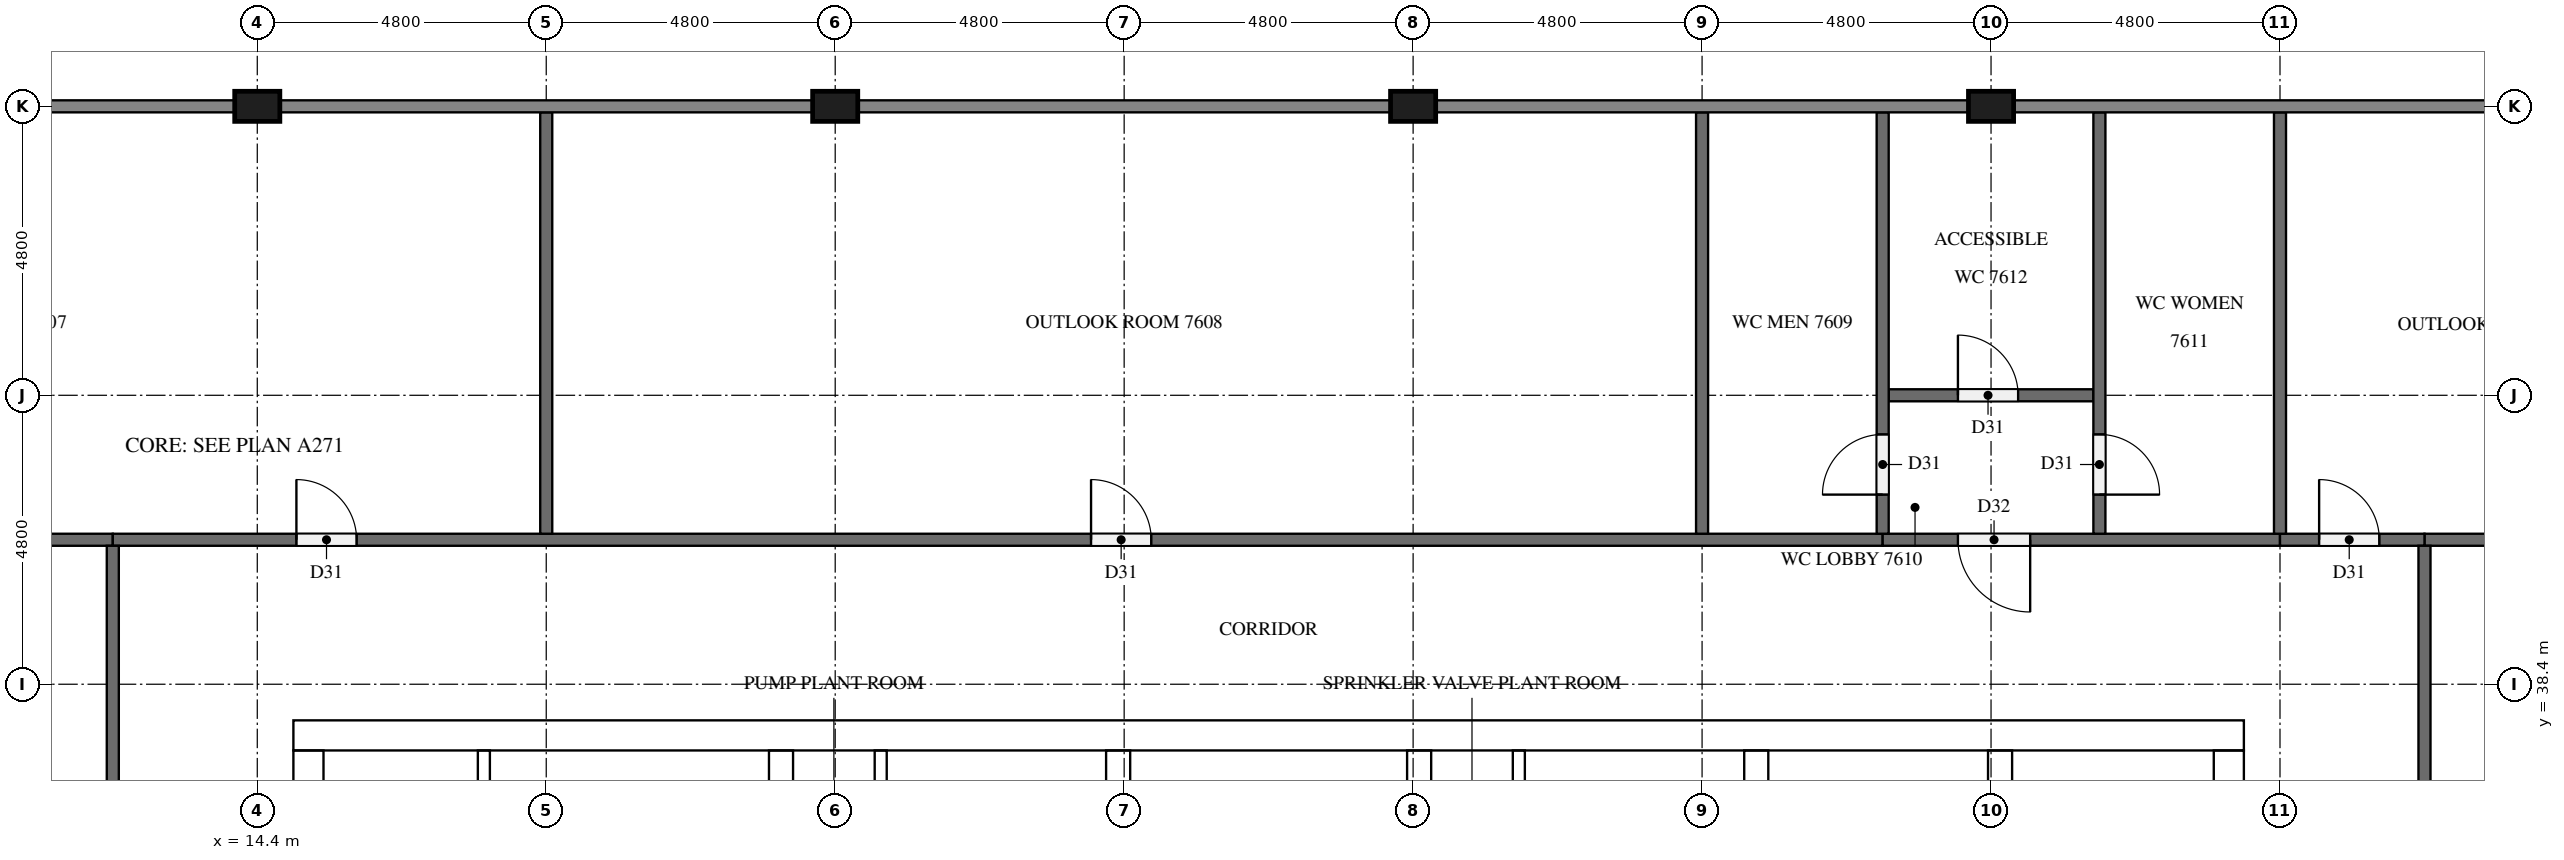
"""IFC4 building model, lengths in metres.
Left out: names, types, materials, properties, quantities, classifications, styles, units other than length and angle.
Written with IfcOpenShell. Run it as: python <this file> out.ifc"""

import sys

from ifc_helpers import new_model, si_unit, direction, frame, frame_2d, origin, origin_2d, place, context, subcontext, project, spatial, rectangle, extrude, element, fill, save


model = new_model("IFC4")
c1 = context("Model", 3, precision=1e-05, world=origin(), true_north=direction((0.0, 1.0)))
c2 = subcontext(c1, "Body", "Model", "MODEL_VIEW")
j1 = project(units=[si_unit("LENGTHUNIT", "METRE"), si_unit("PLANEANGLEUNIT", "RADIAN")], contexts=[c1])
p1 = place(None, origin())
s1 = spatial("IfcSite", under=j1, at=p1, CompositionType="ELEMENT")
p2 = place(p1, origin())
s2 = spatial("IfcBuilding", under=s1, at=p2, CompositionType="ELEMENT")
p3 = place(p2, frame((0.0, 0.0, 291.5)))
s3 = spatial("IfcBuildingStorey", under=s2, at=p3, CompositionType="ELEMENT", Elevation=291.5)
p4 = place(p3, frame((15.0, 37.55, 0.0), z_axis=(0.0, 0.0, 1.0), x_axis=(1.0, 0.0, 0.0)))
e1 = element("IfcWall", 1, at=p4, inside=s3, PredefinedType="SHEAR", context=c2, shape_type="SweptSolid", body=[
    extrude(rectangle(XDim=32.4, YDim=0.5, at=frame_2d((16.2, 0.0))), origin(), (0.0, 0.0, 1.0), 4.4),
])
p5 = place(p4, frame((15.3, 0.0, 0.0)))
e2 = element("IfcOpeningElement", 2, at=p5, cuts=e1, PredefinedType="OPENING", context=c2, shape_type="SweptSolid", body=[
    extrude(rectangle(XDim=1.8, YDim=2.1, at=frame_2d((0.9, 1.05))), frame((0.0, 0.26, 0.0), z_axis=(0.0, -1.0, 0.0), x_axis=(1.0, 0.0, 0.0)), (0.0, 0.0, 1.0), 0.52),
])
p6 = place(p4, frame((1.282, 0.0, 0.0)))
e3 = element("IfcOpeningElement", 3, at=p6, cuts=e1, PredefinedType="OPENING", context=c2, shape_type="SweptSolid", body=[
    extrude(rectangle(XDim=1.0, YDim=2.1, at=frame_2d((0.5, 1.05))), frame((0.0, 0.26, 0.0), z_axis=(0.0, -1.0, 0.0), x_axis=(1.0, 0.0, 0.0)), (0.0, 0.0, 1.0), 0.52),
])
p7 = place(p4, frame((5.082, 0.0, 0.0)))
e4 = element("IfcOpeningElement", 4, at=p7, cuts=e1, PredefinedType="OPENING", context=c2, shape_type="SweptSolid", body=[
    extrude(rectangle(XDim=1.0, YDim=2.1, at=frame_2d((0.5, 1.05))), frame((0.0, 0.26, 0.0), z_axis=(0.0, -1.0, 0.0), x_axis=(1.0, 0.0, 0.0)), (0.0, 0.0, 1.0), 0.52),
])
p8 = place(p3, frame((15.25, 15.5, 0.0), z_axis=(0.0, 0.0, 1.0), x_axis=(0.0, 1.0, 0.0)))
e5 = element("IfcWall", 5, at=p8, inside=s3, PredefinedType="SHEAR", context=c2, shape_type="SweptSolid", body=[
    extrude(rectangle(XDim=21.8, YDim=0.5, at=frame_2d((10.9, 0.0))), origin(), (0.0, 0.0, 1.0), 4.4),
])
p9 = place(p8, frame((5.26, 0.0, 0.0)))
e6 = element("IfcOpeningElement", 6, at=p9, cuts=e5, PredefinedType="OPENING", context=c2, shape_type="SweptSolid", body=[
    extrude(rectangle(XDim=1.2, YDim=2.1, at=frame_2d((0.6, 1.05))), frame((0.0, 0.26, 0.0), z_axis=(0.0, -1.0, 0.0), x_axis=(1.0, 0.0, 0.0)), (0.0, 0.0, 1.0), 0.52),
])
p10 = place(p3, frame((47.15, 15.5, 0.0), z_axis=(0.0, 0.0, 1.0), x_axis=(0.0, 1.0, 0.0)))
e7 = element("IfcWall", 7, at=p10, inside=s3, PredefinedType="SHEAR", context=c2, shape_type="SweptSolid", body=[
    extrude(rectangle(XDim=21.8, YDim=0.5, at=frame_2d((10.9, 0.0))), origin(), (0.0, 0.0, 1.0), 4.4),
])
p11 = place(p10, frame((10.6, 0.0, 0.0)))
e8 = element("IfcOpeningElement", 8, at=p11, cuts=e7, PredefinedType="OPENING", context=c2, shape_type="SweptSolid", body=[
    extrude(rectangle(XDim=1.2, YDim=2.1, at=frame_2d((0.6, 1.05))), frame((0.0, 0.26, 0.0), z_axis=(0.0, -1.0, 0.0), x_axis=(1.0, 0.0, 0.0)), (0.0, 0.0, 1.0), 0.52),
])
p12 = place(p3, frame((23.1, 15.5, 0.0), z_axis=(0.0, 0.0, 1.0), x_axis=(0.0, 1.0, 0.0)))
e9 = element("IfcWall", 9, at=p12, inside=s3, PredefinedType="SHEAR", context=c2, shape_type="SweptSolid", body=[
    extrude(rectangle(XDim=21.8, YDim=0.4, at=frame_2d((10.9, 0.0))), origin(), (0.0, 0.0, 1.0), 4.4),
])
p13 = place(p3, frame((39.3, 27.75, 0.0), z_axis=(0.0, 0.0, 1.0), x_axis=(0.0, 1.0, 0.0)))
e10 = element("IfcWall", 10, at=p13, inside=s3, PredefinedType="SHEAR", context=c2, shape_type="SweptSolid", body=[
    extrude(rectangle(XDim=9.55, YDim=0.4, at=frame_2d((4.775, 0.0))), origin(), (0.0, 0.0, 1.0), 4.4),
])
p14 = place(p3, frame((43.35, 27.75, 0.0), z_axis=(0.0, 0.0, 1.0), x_axis=(0.0, 1.0, 0.0)))
e11 = element("IfcWall", 11, at=p14, inside=s3, PredefinedType="SHEAR", context=c2, shape_type="SweptSolid", body=[
    extrude(rectangle(XDim=9.55, YDim=0.4, at=frame_2d((4.775, 0.0))), origin(), (0.0, 0.0, 1.0), 4.4),
])
p15 = place(p14, frame((7.65, 0.0, 0.0)))
e12 = element("IfcOpeningElement", 12, at=p15, cuts=e11, PredefinedType="OPENING", context=c2, shape_type="SweptSolid", body=[
    extrude(rectangle(XDim=1.2, YDim=2.1, at=frame_2d((0.6, 1.05))), frame((0.0, 0.21, 0.0), z_axis=(0.0, -1.0, 0.0), x_axis=(1.0, 0.0, 0.0)), (0.0, 0.0, 1.0), 0.42),
])
for number, where, z_axis, x_axis in (
    (13, (28.7, 33.75, 0.0), (0.0, 0.0, 1.0), (0.0, 1.0, 0.0)),
    (14, (33.7, 33.75, 0.0), (0.0, 0.0, 1.0), (0.0, 1.0, 0.0)),
):
    element("IfcWall", number, at=place(p3, frame(where, z_axis=z_axis, x_axis=x_axis)), inside=s3, PredefinedType="SHEAR", context=c2, shape_type="SweptSolid", body=[
        extrude(rectangle(XDim=3.55, YDim=0.4, at=frame_2d((1.775, 0.0))), origin(), (0.0, 0.0, 1.0), 4.4),
    ])
for number, where, z_axis, x_axis in (
    (15, (43.2, 48.0, 0.0), (0.0, 0.0, 1.0), (1.0, 0.0, 0.0)),
    (16, (33.6, 48.0, 0.0), (0.0, 0.0, 1.0), (1.0, 0.0, 0.0)),
    (17, (24.0, 48.0, 0.0), (0.0, 0.0, 1.0), (1.0, 0.0, 0.0)),
    (18, (14.4, 48.0, 0.0), (0.0, 0.0, 1.0), (1.0, 0.0, 0.0)),
):
    element("IfcColumn", number, at=place(p3, frame(where, z_axis=z_axis, x_axis=x_axis)), inside=s3, PredefinedType="COLUMN", context=c2, shape_type="SweptSolid", body=[
        extrude(rectangle(XDim=0.75, YDim=0.5, at=origin_2d()), origin(), (0.0, 0.0, 1.0), 4.4),
    ])
p16 = place(p3, frame((18.164, 31.45, 0.0), z_axis=(0.0, 0.0, 1.0), x_axis=(0.0, 1.0, 0.0)))
e19 = element("IfcWall", 19, at=p16, inside=s3, PredefinedType="PARTITIONING", context=c2, shape_type="SweptSolid", body=[
    extrude(rectangle(XDim=5.85, YDim=0.2, at=frame_2d((2.925, 0.0))), origin(), (0.0, 0.0, 1.0), 4.4),
])
for number, where, z_axis, x_axis in (
    (20, (24.756, 33.75, 0.0), (0.0, 0.0, 1.0), (0.0, 1.0, 0.0)),
    (21, (35.356, 33.75, 0.0), (0.0, 0.0, 1.0), (0.0, 1.0, 0.0)),
):
    element("IfcWall", number, at=place(p3, frame(where, z_axis=z_axis, x_axis=x_axis)), inside=s3, PredefinedType="PARTITIONING", context=c2, shape_type="SweptSolid", body=[
        extrude(rectangle(XDim=3.55, YDim=0.2, at=frame_2d((1.775, 0.0))), origin(), (0.0, 0.0, 1.0), 4.4),
    ])
p17 = place(p3, frame((0.1, 40.8, 0.0), z_axis=(0.0, 0.0, 1.0), x_axis=(1.0, 0.0, 0.0)))
e22 = element("IfcWall", 22, at=p17, inside=s3, PredefinedType="PARTITIONING", context=c2, shape_type="SweptSolid", body=[
    extrude(rectangle(XDim=11.9, YDim=0.2, at=frame_2d((5.95, 0.0))), origin(), (0.0, 0.0, 1.0), 4.4),
])
p18 = place(p3, frame((50.4, 40.8, 0.0), z_axis=(0.0, 0.0, 1.0), x_axis=(1.0, 0.0, 0.0)))
e23 = element("IfcWall", 23, at=p18, inside=s3, PredefinedType="PARTITIONING", context=c2, shape_type="SweptSolid", body=[
    extrude(rectangle(XDim=7.1, YDim=0.2, at=frame_2d((3.55, 0.0))), origin(), (0.0, 0.0, 1.0), 4.4),
])
p19 = place(p3, frame((12.0, 40.8, 0.0), z_axis=(0.0, 0.0, 1.0), x_axis=(1.0, 0.0, 0.0)))
e24 = element("IfcWall", 24, at=p19, inside=s3, PredefinedType="PARTITIONING", context=c2, shape_type="SweptSolid", body=[
    extrude(rectangle(XDim=29.4, YDim=0.2, at=frame_2d((14.7, 0.0))), origin(), (0.0, 0.0, 1.0), 4.4),
])
p20 = place(p19, frame((3.05, 0.0, 0.0)))
e25 = element("IfcOpeningElement", 25, at=p20, cuts=e24, PredefinedType="OPENING", context=c2, shape_type="SweptSolid", body=[
    extrude(rectangle(XDim=1.0, YDim=2.1, at=frame_2d((0.5, 1.05))), frame((0.0, 0.11, 0.0), z_axis=(0.0, -1.0, 0.0), x_axis=(1.0, 0.0, 0.0)), (0.0, 0.0, 1.0), 0.22),
])
p21 = place(p19, frame((16.25, 0.0, 0.0)))
e26 = element("IfcOpeningElement", 26, at=p21, cuts=e24, PredefinedType="OPENING", context=c2, shape_type="SweptSolid", body=[
    extrude(rectangle(XDim=1.0, YDim=2.1, at=frame_2d((0.5, 1.05))), frame((0.0, 0.11, 0.0), z_axis=(0.0, -1.0, 0.0), x_axis=(1.0, 0.0, 0.0)), (0.0, 0.0, 1.0), 0.22),
])
p22 = place(p3, frame((48.0, 40.8, 0.0), z_axis=(0.0, 0.0, 1.0), x_axis=(-1.0, 0.0, 0.0)))
e27 = element("IfcWall", 27, at=p22, inside=s3, PredefinedType="PARTITIONING", context=c2, shape_type="SweptSolid", body=[
    extrude(rectangle(XDim=6.6, YDim=0.2, at=frame_2d((3.3, 0.0))), origin(), (0.0, 0.0, 1.0), 4.4),
])
p23 = place(p22, frame((4.15, 0.0, 0.0)))
e28 = element("IfcOpeningElement", 28, at=p23, cuts=e27, PredefinedType="OPENING", context=c2, shape_type="SweptSolid", body=[
    extrude(rectangle(XDim=1.2, YDim=2.1, at=frame_2d((0.6, 1.05))), frame((0.0, 0.11, 0.0), z_axis=(0.0, -1.0, 0.0), x_axis=(1.0, 0.0, 0.0)), (0.0, 0.0, 1.0), 0.22),
])
p24 = place(p3, frame((48.0, 40.8, 0.0), z_axis=(0.0, 0.0, 1.0), x_axis=(1.0, 0.0, 0.0)))
e29 = element("IfcWall", 29, at=p24, inside=s3, PredefinedType="PARTITIONING", context=c2, shape_type="SweptSolid", body=[
    extrude(rectangle(XDim=2.4, YDim=0.2, at=frame_2d((1.2, 0.0))), origin(), (0.0, 0.0, 1.0), 4.4),
])
p25 = place(p24, frame((0.65, 0.0, 0.0)))
e30 = element("IfcOpeningElement", 30, at=p25, cuts=e29, PredefinedType="OPENING", context=c2, shape_type="SweptSolid", body=[
    extrude(rectangle(XDim=1.0, YDim=2.1, at=frame_2d((0.5, 1.05))), frame((0.0, 0.11, 0.0), z_axis=(0.0, -1.0, 0.0), x_axis=(1.0, 0.0, 0.0)), (0.0, 0.0, 1.0), 0.22),
])
p26 = place(p3, frame((41.5, 43.2, 0.0), z_axis=(0.0, 0.0, 1.0), x_axis=(1.0, 0.0, 0.0)))
e31 = element("IfcWall", 31, at=p26, inside=s3, PredefinedType="PARTITIONING", context=c2, shape_type="SweptSolid", body=[
    extrude(rectangle(XDim=3.4, YDim=0.2, at=frame_2d((1.7, 0.0))), origin(), (0.0, 0.0, 1.0), 4.4),
])
p27 = place(p26, frame((1.15, 0.0, 0.0)))
e32 = element("IfcOpeningElement", 32, at=p27, cuts=e31, PredefinedType="OPENING", context=c2, shape_type="SweptSolid", body=[
    extrude(rectangle(XDim=1.0, YDim=2.1, at=frame_2d((0.5, 1.05))), frame((0.0, 0.11, 0.0), z_axis=(0.0, -1.0, 0.0), x_axis=(1.0, 0.0, 0.0)), (0.0, 0.0, 1.0), 0.22),
])
p28 = place(p3, frame((12.0, 12.1, 0.0), z_axis=(0.0, 0.0, 1.0), x_axis=(0.0, 1.0, 0.0)))
e33 = element("IfcWall", 33, at=p28, inside=s3, PredefinedType="PARTITIONING", context=c2, shape_type="SweptSolid", body=[
    extrude(rectangle(XDim=28.6, YDim=0.2, at=frame_2d((14.3, 0.0))), origin(), (0.0, 0.0, 1.0), 4.4),
])
p29 = place(p28, frame((7.85, 0.0, 0.0)))
e34 = element("IfcOpeningElement", 34, at=p29, cuts=e33, PredefinedType="OPENING", context=c2, shape_type="SweptSolid", body=[
    extrude(rectangle(XDim=1.0, YDim=2.1, at=frame_2d((0.5, 1.05))), frame((0.0, 0.11, 0.0), z_axis=(0.0, -1.0, 0.0), x_axis=(1.0, 0.0, 0.0)), (0.0, 0.0, 1.0), 0.22),
])
p30 = place(p28, frame((22.15, 0.0, 0.0)))
e35 = element("IfcOpeningElement", 35, at=p30, cuts=e33, PredefinedType="OPENING", context=c2, shape_type="SweptSolid", body=[
    extrude(rectangle(XDim=1.0, YDim=2.1, at=frame_2d((0.5, 1.05))), frame((0.0, 0.11, 0.0), z_axis=(0.0, -1.0, 0.0), x_axis=(1.0, 0.0, 0.0)), (0.0, 0.0, 1.0), 0.22),
])
for number, where, z_axis, x_axis in (
    (36, (19.2, 40.9, 0.0), (0.0, 0.0, 1.0), (0.0, 1.0, 0.0)),
    (37, (38.4, 40.9, 0.0), (0.0, 0.0, 1.0), (0.0, 1.0, 0.0)),
):
    element("IfcWall", number, at=place(p3, frame(where, z_axis=z_axis, x_axis=x_axis)), inside=s3, PredefinedType="PARTITIONING", context=c2, shape_type="SweptSolid", body=[
        extrude(rectangle(XDim=7.0, YDim=0.2, at=frame_2d((3.5, 0.0))), origin(), (0.0, 0.0, 1.0), 4.4),
    ])
p31 = place(p3, frame((41.4, 40.9, 0.0), z_axis=(0.0, 0.0, 1.0), x_axis=(0.0, 1.0, 0.0)))
e38 = element("IfcWall", 38, at=p31, inside=s3, PredefinedType="PARTITIONING", context=c2, shape_type="SweptSolid", body=[
    extrude(rectangle(XDim=7.0, YDim=0.2, at=frame_2d((3.5, 0.0))), origin(), (0.0, 0.0, 1.0), 4.4),
])
p32 = place(p31, frame((0.65, 0.0, 0.0)))
e39 = element("IfcOpeningElement", 39, at=p32, cuts=e38, PredefinedType="OPENING", context=c2, shape_type="SweptSolid", body=[
    extrude(rectangle(XDim=1.0, YDim=2.1, at=frame_2d((0.5, 1.05))), frame((0.0, 0.11, 0.0), z_axis=(0.0, -1.0, 0.0), x_axis=(1.0, 0.0, 0.0)), (0.0, 0.0, 1.0), 0.22),
])
p33 = place(p3, frame((45.0, 47.9, 0.0), z_axis=(0.0, 0.0, 1.0), x_axis=(0.0, -1.0, 0.0)))
e40 = element("IfcWall", 40, at=p33, inside=s3, PredefinedType="PARTITIONING", context=c2, shape_type="SweptSolid", body=[
    extrude(rectangle(XDim=7.0, YDim=0.2, at=frame_2d((3.5, 0.0))), origin(), (0.0, 0.0, 1.0), 4.4),
])
p34 = place(p33, frame((5.35, 0.0, 0.0)))
e41 = element("IfcOpeningElement", 41, at=p34, cuts=e40, PredefinedType="OPENING", context=c2, shape_type="SweptSolid", body=[
    extrude(rectangle(XDim=1.0, YDim=2.1, at=frame_2d((0.5, 1.05))), frame((0.0, 0.11, 0.0), z_axis=(0.0, -1.0, 0.0), x_axis=(1.0, 0.0, 0.0)), (0.0, 0.0, 1.0), 0.22),
])
p35 = place(p3, frame((48.0, 40.9, 0.0), z_axis=(0.0, 0.0, 1.0), x_axis=(0.0, 1.0, 0.0)))
e42 = element("IfcWall", 42, at=p35, inside=s3, PredefinedType="PARTITIONING", context=c2, shape_type="SweptSolid", body=[
    extrude(rectangle(XDim=7.0, YDim=0.2, at=frame_2d((3.5, 0.0))), origin(), (0.0, 0.0, 1.0), 4.4),
])
p36 = place(p3, frame((50.4, 40.7, 0.0), z_axis=(0.0, 0.0, 1.0), x_axis=(0.0, -1.0, 0.0)))
e43 = element("IfcWall", 43, at=p36, inside=s3, PredefinedType="PARTITIONING", context=c2, shape_type="SweptSolid", body=[
    extrude(rectangle(XDim=28.6, YDim=0.2, at=frame_2d((14.3, 0.0))), origin(), (0.0, 0.0, 1.0), 4.4),
])
p37 = place(p36, frame((19.75, 0.0, 0.0)))
e44 = element("IfcOpeningElement", 44, at=p37, cuts=e43, PredefinedType="OPENING", context=c2, shape_type="SweptSolid", body=[
    extrude(rectangle(XDim=1.0, YDim=2.1, at=frame_2d((0.5, 1.05))), frame((0.0, 0.11, 0.0), z_axis=(0.0, -1.0, 0.0), x_axis=(1.0, 0.0, 0.0)), (0.0, 0.0, 1.0), 0.22),
])
p38 = place(p36, frame((5.45, 0.0, 0.0)))
e45 = element("IfcOpeningElement", 45, at=p38, cuts=e43, PredefinedType="OPENING", context=c2, shape_type="SweptSolid", body=[
    extrude(rectangle(XDim=1.0, YDim=2.1, at=frame_2d((0.5, 1.05))), frame((0.0, 0.11, 0.0), z_axis=(0.0, -1.0, 0.0), x_axis=(1.0, 0.0, 0.0)), (0.0, 0.0, 1.0), 0.22),
])
p39 = place(p5, origin())
e46 = element("IfcDoor", 46, at=p39, inside=s3, OperationType="DOUBLE_DOOR_SINGLE_SWING", PredefinedType="DOOR", context=c2, shape_type="SweptSolid", body=[
    extrude(rectangle(XDim=1.8, YDim=2.1, at=frame_2d((0.9, 1.05))), frame((0.0, 0.025, 0.0), z_axis=(0.0, -1.0, 0.0), x_axis=(1.0, 0.0, 0.0)), (0.0, 0.0, 1.0), 0.05),
])
fill(e2, e46)
p40 = place(p6, origin())
e47 = element("IfcDoor", 47, at=p40, inside=s3, OperationType="SINGLE_SWING_LEFT", PredefinedType="DOOR", context=c2, shape_type="SweptSolid", body=[
    extrude(rectangle(XDim=1.0, YDim=2.1, at=frame_2d((0.5, 1.05))), frame((0.0, 0.025, 0.0), z_axis=(0.0, -1.0, 0.0), x_axis=(1.0, 0.0, 0.0)), (0.0, 0.0, 1.0), 0.05),
])
fill(e3, e47)
p41 = place(p7, origin())
e48 = element("IfcDoor", 48, at=p41, inside=s3, OperationType="SINGLE_SWING_RIGHT", PredefinedType="DOOR", context=c2, shape_type="SweptSolid", body=[
    extrude(rectangle(XDim=1.0, YDim=2.1, at=frame_2d((0.5, 1.05))), frame((0.0, 0.025, 0.0), z_axis=(0.0, -1.0, 0.0), x_axis=(1.0, 0.0, 0.0)), (0.0, 0.0, 1.0), 0.05),
])
fill(e4, e48)
p42 = place(p20, origin())
e49 = element("IfcDoor", 49, at=p42, inside=s3, OperationType="SINGLE_SWING_LEFT", PredefinedType="DOOR", context=c2, shape_type="SweptSolid", body=[
    extrude(rectangle(XDim=1.0, YDim=2.1, at=frame_2d((0.5, 1.05))), frame((0.0, 0.025, 0.0), z_axis=(0.0, -1.0, 0.0), x_axis=(1.0, 0.0, 0.0)), (0.0, 0.0, 1.0), 0.05),
])
fill(e25, e49)
p43 = place(p21, origin())
e50 = element("IfcDoor", 50, at=p43, inside=s3, OperationType="SINGLE_SWING_LEFT", PredefinedType="DOOR", context=c2, shape_type="SweptSolid", body=[
    extrude(rectangle(XDim=1.0, YDim=2.1, at=frame_2d((0.5, 1.05))), frame((0.0, 0.025, 0.0), z_axis=(0.0, -1.0, 0.0), x_axis=(1.0, 0.0, 0.0)), (0.0, 0.0, 1.0), 0.05),
])
fill(e26, e50)
p44 = place(p23, origin())
e51 = element("IfcDoor", 51, at=p44, inside=s3, OperationType="SINGLE_SWING_LEFT", PredefinedType="DOOR", context=c2, shape_type="SweptSolid", body=[
    extrude(rectangle(XDim=1.2, YDim=2.1, at=frame_2d((0.6, 1.05))), frame((0.0, 0.025, 0.0), z_axis=(0.0, -1.0, 0.0), x_axis=(1.0, 0.0, 0.0)), (0.0, 0.0, 1.0), 0.05),
])
fill(e28, e51)
p45 = place(p32, origin())
e52 = element("IfcDoor", 52, at=p45, inside=s3, OperationType="SINGLE_SWING_LEFT", PredefinedType="DOOR", context=c2, shape_type="SweptSolid", body=[
    extrude(rectangle(XDim=1.0, YDim=2.1, at=frame_2d((0.5, 1.05))), frame((0.0, 0.025, 0.0), z_axis=(0.0, -1.0, 0.0), x_axis=(1.0, 0.0, 0.0)), (0.0, 0.0, 1.0), 0.05),
])
fill(e39, e52)
p46 = place(p34, origin())
e53 = element("IfcDoor", 53, at=p46, inside=s3, OperationType="SINGLE_SWING_RIGHT", PredefinedType="DOOR", context=c2, shape_type="SweptSolid", body=[
    extrude(rectangle(XDim=1.0, YDim=2.1, at=frame_2d((0.5, 1.05))), frame((0.0, 0.025, 0.0), z_axis=(0.0, -1.0, 0.0), x_axis=(1.0, 0.0, 0.0)), (0.0, 0.0, 1.0), 0.05),
])
fill(e41, e53)
p47 = place(p27, origin())
e54 = element("IfcDoor", 54, at=p47, inside=s3, OperationType="SINGLE_SWING_LEFT", PredefinedType="DOOR", context=c2, shape_type="SweptSolid", body=[
    extrude(rectangle(XDim=1.0, YDim=2.1, at=frame_2d((0.5, 1.05))), frame((0.0, 0.025, 0.0), z_axis=(0.0, -1.0, 0.0), x_axis=(1.0, 0.0, 0.0)), (0.0, 0.0, 1.0), 0.05),
])
fill(e32, e54)
p48 = place(p25, origin())
e55 = element("IfcDoor", 55, at=p48, inside=s3, OperationType="SINGLE_SWING_LEFT", PredefinedType="DOOR", context=c2, shape_type="SweptSolid", body=[
    extrude(rectangle(XDim=1.0, YDim=2.1, at=frame_2d((0.5, 1.05))), frame((0.0, 0.025, 0.0), z_axis=(0.0, -1.0, 0.0), x_axis=(1.0, 0.0, 0.0)), (0.0, 0.0, 1.0), 0.05),
])
fill(e30, e55)
save(model, sys.argv[1])
